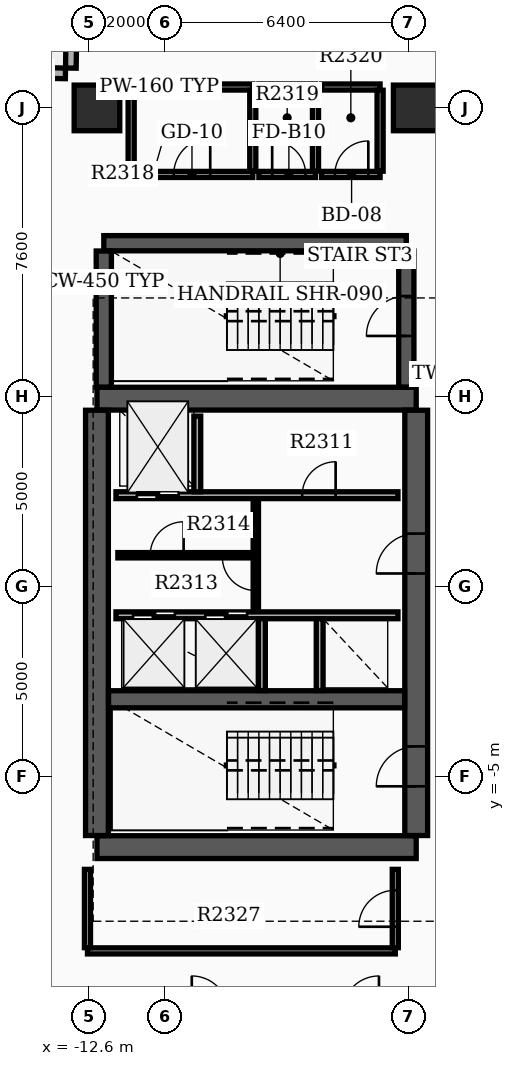
"""IFC4 building model, lengths in metres.
Left out: names, types, materials, properties, quantities, classifications, styles, units other than length and angle.
Written with IfcOpenShell. Run it as: python <this file> out.ifc"""

import sys

from ifc_helpers import new_model, si_unit, direction, frame, frame_2d, origin, origin_2d, place, context, subcontext, project, spatial, rectangle, extrude, element, fill, save


model = new_model("IFC4")
c1 = context("Model", 3, precision=1e-05, world=origin(), true_north=direction((0.0, 1.0)))
c2 = subcontext(c1, "Body", "Model", "MODEL_VIEW")
j1 = project(units=[si_unit("LENGTHUNIT", "METRE"), si_unit("PLANEANGLEUNIT", "RADIAN")], contexts=[c1])
p1 = place(None, origin())
s1 = spatial("IfcSite", under=j1, at=p1, CompositionType="ELEMENT")
p2 = place(p1, origin())
s2 = spatial("IfcBuilding", under=s1, at=p2, CompositionType="ELEMENT")
p3 = place(p2, frame((0.0, 0.0, 148.8)))
s3 = spatial("IfcBuildingStorey", under=s2, at=p3, CompositionType="ELEMENT", Elevation=148.8)
for number, where, z_axis, x_axis in (
    (1, (-12.4, -6.85, 0.0), (0.0, 0.0, 1.0), (1.0, 0.0, 0.0)),
    (2, (-12.4, 4.95, 0.0), (0.0, 0.0, 1.0), (1.0, 0.0, 0.0)),
):
    element("IfcWall", number, at=place(p3, frame(where, z_axis=z_axis, x_axis=x_axis)), inside=s3, PredefinedType="SHEAR", context=c2, shape_type="SweptSolid", body=[
        extrude(rectangle(XDim=8.4, YDim=0.6, at=frame_2d((4.2, 0.0))), origin(), (0.0, 0.0, 1.0), 3.7),
    ])
p4 = place(p3, frame((-12.4, -6.545, 0.0), z_axis=(0.0, 0.0, 1.0), x_axis=(0.0, 1.0, 0.0)))
e3 = element("IfcWall", 3, at=p4, inside=s3, PredefinedType="SHEAR", context=c2, shape_type="SweptSolid", body=[
    extrude(rectangle(XDim=11.19, YDim=0.6, at=frame_2d((5.595, 0.0))), origin(), (0.0, 0.0, 1.0), 3.7),
])
p5 = place(p3, frame((-4.0, -6.545, 0.0), z_axis=(0.0, 0.0, 1.0), x_axis=(0.0, 1.0, 0.0)))
e4 = element("IfcWall", 4, at=p5, inside=s3, PredefinedType="SHEAR", context=c2, shape_type="SweptSolid", body=[
    extrude(rectangle(XDim=11.19, YDim=0.6, at=frame_2d((5.595, 0.0))), origin(), (0.0, 0.0, 1.0), 3.7),
])
p6 = place(p5, frame((1.295, 0.0, 0.0)))
e5 = element("IfcOpeningElement", 5, at=p6, cuts=e4, PredefinedType="OPENING", context=c2, shape_type="SweptSolid", body=[
    extrude(rectangle(XDim=1.05, YDim=2.15, at=frame_2d((0.525, 1.075))), frame((0.0, 0.31, 0.0), z_axis=(0.0, -1.0, 0.0), x_axis=(1.0, 0.0, 0.0)), (0.0, 0.0, 1.0), 0.62),
])
p7 = place(p5, frame((6.895, 0.0, 0.0)))
e6 = element("IfcOpeningElement", 6, at=p7, cuts=e4, PredefinedType="OPENING", context=c2, shape_type="SweptSolid", body=[
    extrude(rectangle(XDim=1.05, YDim=2.15, at=frame_2d((0.525, 1.075))), frame((0.0, 0.31, 0.0), z_axis=(0.0, -1.0, 0.0), x_axis=(1.0, 0.0, 0.0)), (0.0, 0.0, 1.0), 0.62),
])
p8 = place(p3, frame((-12.095, -2.96, 0.0), z_axis=(0.0, 0.0, 1.0), x_axis=(1.0, 0.0, 0.0)))
e7 = element("IfcWall", 7, at=p8, inside=s3, PredefinedType="SHEAR", context=c2, shape_type="SweptSolid", body=[
    extrude(rectangle(XDim=7.79, YDim=0.45, at=frame_2d((3.895, 0.0))), origin(), (0.0, 0.0, 1.0), 3.7),
])
p9 = place(p3, frame((-12.22, 9.04, 0.0), z_axis=(0.0, 0.0, 1.0), x_axis=(1.0, 0.0, 0.0)))
e8 = element("IfcWall", 8, at=p9, inside=s3, PredefinedType="SHEAR", context=c2, shape_type="SweptSolid", body=[
    extrude(rectangle(XDim=7.96, YDim=0.4, at=frame_2d((3.98, 0.0))), origin(), (0.0, 0.0, 1.0), 3.7),
])
p10 = place(p3, frame((-12.22, 5.255, 0.0), z_axis=(0.0, 0.0, 1.0), x_axis=(0.0, 1.0, 0.0)))
e9 = element("IfcWall", 9, at=p10, inside=s3, PredefinedType="SHEAR", context=c2, shape_type="SweptSolid", body=[
    extrude(rectangle(XDim=3.58, YDim=0.4, at=frame_2d((1.79, 0.0))), origin(), (0.0, 0.0, 1.0), 3.7),
])
p11 = place(p3, frame((-4.26, 5.255, 0.0), z_axis=(0.0, 0.0, 1.0), x_axis=(0.0, 1.0, 0.0)))
e10 = element("IfcWall", 10, at=p11, inside=s3, PredefinedType="SHEAR", context=c2, shape_type="SweptSolid", body=[
    extrude(rectangle(XDim=3.58, YDim=0.4, at=frame_2d((1.79, 0.0))), origin(), (0.0, 0.0, 1.0), 3.7),
])
p12 = place(p11, frame((1.345, 0.0, 0.0)))
e11 = element("IfcOpeningElement", 11, at=p12, cuts=e10, PredefinedType="OPENING", context=c2, shape_type="SweptSolid", body=[
    extrude(rectangle(XDim=1.05, YDim=2.15, at=frame_2d((0.525, 1.075))), frame((0.0, 0.21, 0.0), z_axis=(0.0, -1.0, 0.0), x_axis=(1.0, 0.0, 0.0)), (0.0, 0.0, 1.0), 0.42),
])
for number, where, z_axis, x_axis in (
    (12, (-12.4, 12.6, 0.0), (0.0, 0.0, 1.0), (1.0, 0.0, 0.0)),
    (13, (-4.0, 12.6, 0.0), (0.0, 0.0, 1.0), (1.0, 0.0, 0.0)),
):
    element("IfcColumn", number, at=place(p3, frame(where, z_axis=z_axis, x_axis=x_axis)), inside=s3, PredefinedType="COLUMN", context=c2, shape_type="SweptSolid", body=[
        extrude(rectangle(XDim=1.2, YDim=1.2, at=origin_2d()), origin(), (0.0, 0.0, 1.0), 3.9),
    ])
p13 = place(p3, frame((-14.449, 13.529, 0.0), z_axis=(0.0, 0.0, 1.0), x_axis=(0.999878147354, -0.015610587569, 0.0)))
e14 = element("IfcWall", 14, at=p13, inside=s3, PredefinedType="STANDARD", context=c2, shape_type="SweptSolid", body=[
    extrude(rectangle(XDim=1.22, YDim=0.28, at=frame_2d((0.61, 0.0))), origin(), (0.0, 0.0, 1.0), 2.97),
])
p14 = place(p3, frame((-13.087, 13.647, 0.0), z_axis=(0.0, 0.0, 1.0), x_axis=(0.015785793208, 0.999875396603, 0.0)))
e15 = element("IfcWall", 15, at=p14, inside=s3, PredefinedType="STANDARD", context=c2, shape_type="SweptSolid", body=[
    extrude(rectangle(XDim=1.5, YDim=0.28, at=frame_2d((0.75, 0.0))), origin(), (0.0, 0.0, 1.0), 2.97),
])
p15 = place(p3, frame((-11.9, 2.41, 0.0), z_axis=(0.0, 0.0, 1.0), x_axis=(1.0, 0.0, 0.0)))
e16 = element("IfcWall", 16, at=p15, inside=s3, PredefinedType="SOLIDWALL", context=c2, shape_type="SweptSolid", body=[
    extrude(rectangle(XDim=7.42, YDim=0.18, at=frame_2d((3.71, 0.0))), origin(), (0.0, 0.0, 1.0), 2.96),
])
p16 = place(p15, frame((0.55, 0.0, 0.0)))
e17 = element("IfcOpeningElement", 17, at=p16, cuts=e16, PredefinedType="OPENING", context=c2, shape_type="SweptSolid", body=[
    extrude(rectangle(XDim=1.1, YDim=2.15, at=frame_2d((0.55, 1.075))), frame((0.0, 0.1, 0.0), z_axis=(0.0, -1.0, 0.0), x_axis=(1.0, 0.0, 0.0)), (0.0, 0.0, 1.0), 0.2),
])
p17 = place(p15, frame((4.9, 0.0, 0.0)))
e18 = element("IfcOpeningElement", 18, at=p17, cuts=e16, PredefinedType="OPENING", context=c2, shape_type="SweptSolid", body=[
    extrude(rectangle(XDim=0.88, YDim=2.1, at=frame_2d((0.44, 1.05))), frame((0.0, 0.1, 0.0), z_axis=(0.0, -1.0, 0.0), x_axis=(1.0, 0.0, 0.0)), (0.0, 0.0, 1.0), 0.2),
])
p18 = place(p3, frame((-11.9, -0.75, 0.0), z_axis=(0.0, 0.0, 1.0), x_axis=(1.0, 0.0, 0.0)))
e19 = element("IfcWall", 19, at=p18, inside=s3, PredefinedType="SOLIDWALL", context=c2, shape_type="SweptSolid", body=[
    extrude(rectangle(XDim=7.42, YDim=0.18, at=frame_2d((3.71, 0.0))), origin(), (0.0, 0.0, 1.0), 2.96),
])
p19 = place(p18, frame((0.45, 0.0, 0.0)))
e20 = element("IfcOpeningElement", 20, at=p19, cuts=e19, PredefinedType="OPENING", context=c2, shape_type="SweptSolid", body=[
    extrude(rectangle(XDim=1.1, YDim=2.15, at=frame_2d((0.55, 1.075))), frame((0.0, 0.1, 0.0), z_axis=(0.0, -1.0, 0.0), x_axis=(1.0, 0.0, 0.0)), (0.0, 0.0, 1.0), 0.2),
])
p20 = place(p18, frame((2.35, 0.0, 0.0)))
e21 = element("IfcOpeningElement", 21, at=p20, cuts=e19, PredefinedType="OPENING", context=c2, shape_type="SweptSolid", body=[
    extrude(rectangle(XDim=1.1, YDim=2.15, at=frame_2d((0.55, 1.075))), frame((0.0, 0.1, 0.0), z_axis=(0.0, -1.0, 0.0), x_axis=(1.0, 0.0, 0.0)), (0.0, 0.0, 1.0), 0.2),
])
p21 = place(p3, frame((-9.76, 2.5, 0.0), z_axis=(0.0, 0.0, 1.0), x_axis=(0.0, 1.0, 0.0)))
e22 = element("IfcWall", 22, at=p21, inside=s3, PredefinedType="SOLIDWALL", context=c2, shape_type="SweptSolid", body=[
    extrude(rectangle(XDim=1.99, YDim=0.18, at=frame_2d((0.995, 0.0))), origin(), (0.0, 0.0, 1.0), 2.96),
])
for number, where, z_axis, x_axis in (
    (23, (-8.06, -2.73, 0.0), (0.0, 0.0, 1.0), (0.0, 1.0, 0.0)),
    (24, (-6.54, -2.73, 0.0), (0.0, 0.0, 1.0), (0.0, 1.0, 0.0)),
):
    element("IfcWall", number, at=place(p3, frame(where, z_axis=z_axis, x_axis=x_axis)), inside=s3, PredefinedType="SOLIDWALL", context=c2, shape_type="SweptSolid", body=[
        extrude(rectangle(XDim=1.89, YDim=0.18, at=frame_2d((0.945, 0.0))), origin(), (0.0, 0.0, 1.0), 2.96),
    ])
p22 = place(p3, frame((-8.22, -0.65, 0.0), z_axis=(0.0, 0.0, 1.0), x_axis=(0.0, 1.0, 0.0)))
e25 = element("IfcWall", 25, at=p22, inside=s3, PredefinedType="SOLIDWALL", context=c2, shape_type="SweptSolid", body=[
    extrude(rectangle(XDim=2.96, YDim=0.14, at=frame_2d((1.48, 0.0))), origin(), (0.0, 0.0, 1.0), 2.96),
])
p23 = place(p22, frame((0.55, 0.0, 0.0)))
e26 = element("IfcOpeningElement", 26, at=p23, cuts=e25, PredefinedType="OPENING", context=c2, shape_type="SweptSolid", body=[
    extrude(rectangle(XDim=0.88, YDim=2.1, at=frame_2d((0.44, 1.05))), frame((0.0, 0.08, 0.0), z_axis=(0.0, -1.0, 0.0), x_axis=(1.0, 0.0, 0.0)), (0.0, 0.0, 1.0), 0.16),
])
p24 = place(p3, frame((-11.85, 0.83, 0.0), z_axis=(0.0, 0.0, 1.0), x_axis=(1.0, 0.0, 0.0)))
e27 = element("IfcWall", 27, at=p24, inside=s3, PredefinedType="PARTITIONING", context=c2, shape_type="SweptSolid", body=[
    extrude(rectangle(XDim=3.552, YDim=0.14, at=frame_2d((1.776, 0.0))), origin(), (0.0, 0.0, 1.0), 2.96),
])
p25 = place(p24, frame((0.85, 0.0, 0.0)))
e28 = element("IfcOpeningElement", 28, at=p25, cuts=e27, PredefinedType="OPENING", context=c2, shape_type="SweptSolid", body=[
    extrude(rectangle(XDim=0.88, YDim=2.1, at=frame_2d((0.44, 1.05))), frame((0.0, 0.08, 0.0), z_axis=(0.0, -1.0, 0.0), x_axis=(1.0, 0.0, 0.0)), (0.0, 0.0, 1.0), 0.16),
])
p26 = place(p3, frame((-11.5, 10.85, 0.0), z_axis=(0.0, 0.0, 1.0), x_axis=(1.0, 0.0, 0.0)))
e29 = element("IfcWall", 29, at=p26, inside=s3, PredefinedType="PARTITIONING", context=c2, shape_type="SweptSolid", body=[
    extrude(rectangle(XDim=3.2, YDim=0.16, at=frame_2d((1.6, 0.0))), origin(), (0.0, 0.0, 1.0), 2.96),
])
p27 = place(p26, frame((1.12, 0.0, 0.0)))
e30 = element("IfcOpeningElement", 30, at=p27, cuts=e29, PredefinedType="OPENING", context=c2, shape_type="SweptSolid", body=[
    extrude(rectangle(XDim=0.96, YDim=2.15, at=frame_2d((0.48, 1.075))), frame((0.0, 0.09, 0.0), z_axis=(0.0, -1.0, 0.0), x_axis=(1.0, 0.0, 0.0)), (0.0, 0.0, 1.0), 0.18),
])
p28 = place(p3, frame((-11.5, 13.15, 0.0), z_axis=(0.0, 0.0, 1.0), x_axis=(1.0, 0.0, 0.0)))
e31 = element("IfcWall", 31, at=p28, inside=s3, PredefinedType="PARTITIONING", context=c2, shape_type="SweptSolid", body=[
    extrude(rectangle(XDim=3.2, YDim=0.16, at=frame_2d((1.6, 0.0))), origin(), (0.0, 0.0, 1.0), 2.96),
])
for number, where, z_axis, x_axis in (
    (32, (-11.5, 10.935, 0.0), (0.0, 0.0, 1.0), (0.0, 1.0, 0.0)),
    (33, (-8.3, 10.935, 0.0), (0.0, 0.0, 1.0), (0.0, 1.0, 0.0)),
):
    element("IfcWall", number, at=place(p3, frame(where, z_axis=z_axis, x_axis=x_axis)), inside=s3, PredefinedType="PARTITIONING", context=c2, shape_type="SweptSolid", body=[
        extrude(rectangle(XDim=2.13, YDim=0.16, at=frame_2d((1.065, 0.0))), origin(), (0.0, 0.0, 1.0), 2.96),
    ])
p29 = place(p3, frame((-8.14, 10.85, 0.0), z_axis=(0.0, 0.0, 1.0), x_axis=(1.0, 0.0, 0.0)))
e34 = element("IfcWall", 34, at=p29, inside=s3, PredefinedType="PARTITIONING", context=c2, shape_type="SweptSolid", body=[
    extrude(rectangle(XDim=1.49, YDim=0.16, at=frame_2d((0.745, 0.0))), origin(), (0.0, 0.0, 1.0), 2.96),
])
p30 = place(p29, frame((0.35, 0.0, 0.0)))
e35 = element("IfcOpeningElement", 35, at=p30, cuts=e34, PredefinedType="OPENING", context=c2, shape_type="SweptSolid", body=[
    extrude(rectangle(XDim=0.88, YDim=2.1, at=frame_2d((0.44, 1.05))), frame((0.0, 0.09, 0.0), z_axis=(0.0, -1.0, 0.0), x_axis=(1.0, 0.0, 0.0)), (0.0, 0.0, 1.0), 0.18),
])
p31 = place(p3, frame((-8.14, 13.15, 0.0), z_axis=(0.0, 0.0, 1.0), x_axis=(1.0, 0.0, 0.0)))
e36 = element("IfcWall", 36, at=p31, inside=s3, PredefinedType="PARTITIONING", context=c2, shape_type="SweptSolid", body=[
    extrude(rectangle(XDim=1.49, YDim=0.16, at=frame_2d((0.745, 0.0))), origin(), (0.0, 0.0, 1.0), 2.96),
])
p32 = place(p3, frame((-6.65, 10.935, 0.0), z_axis=(0.0, 0.0, 1.0), x_axis=(0.0, 1.0, 0.0)))
e37 = element("IfcWall", 37, at=p32, inside=s3, PredefinedType="PARTITIONING", context=c2, shape_type="SweptSolid", body=[
    extrude(rectangle(XDim=2.13, YDim=0.16, at=frame_2d((1.065, 0.0))), origin(), (0.0, 0.0, 1.0), 2.96),
])
p33 = place(p3, frame((-6.49, 10.85, 0.0), z_axis=(0.0, 0.0, 1.0), x_axis=(1.0, 0.0, 0.0)))
e38 = element("IfcWall", 38, at=p33, inside=s3, PredefinedType="PARTITIONING", context=c2, shape_type="SweptSolid", body=[
    extrude(rectangle(XDim=1.54, YDim=0.16, at=frame_2d((0.77, 0.0))), origin(), (0.0, 0.0, 1.0), 2.96),
])
p34 = place(p33, frame((0.35, 0.0, 0.0)))
e39 = element("IfcOpeningElement", 39, at=p34, cuts=e38, PredefinedType="OPENING", context=c2, shape_type="SweptSolid", body=[
    extrude(rectangle(XDim=0.88, YDim=2.15, at=frame_2d((0.44, 1.075))), frame((0.0, 0.09, 0.0), z_axis=(0.0, -1.0, 0.0), x_axis=(1.0, 0.0, 0.0)), (0.0, 0.0, 1.0), 0.18),
])
p35 = place(p3, frame((-6.49, 13.15, 0.0), z_axis=(0.0, 0.0, 1.0), x_axis=(1.0, 0.0, 0.0)))
e40 = element("IfcWall", 40, at=p35, inside=s3, PredefinedType="PARTITIONING", context=c2, shape_type="SweptSolid", body=[
    extrude(rectangle(XDim=1.54, YDim=0.16, at=frame_2d((0.77, 0.0))), origin(), (0.0, 0.0, 1.0), 2.96),
])
p36 = place(p3, frame((-4.95, 10.935, 0.0), z_axis=(0.0, 0.0, 1.0), x_axis=(0.0, 1.0, 0.0)))
e41 = element("IfcWall", 41, at=p36, inside=s3, PredefinedType="PARTITIONING", context=c2, shape_type="SweptSolid", body=[
    extrude(rectangle(XDim=2.13, YDim=0.16, at=frame_2d((1.065, 0.0))), origin(), (0.0, 0.0, 1.0), 2.96),
])
p37 = place(p3, frame((-12.65, -9.58, 0.0), z_axis=(0.0, 0.0, 1.0), x_axis=(1.0, 0.0, 0.0)))
e42 = element("IfcWall", 42, at=p37, inside=s3, PredefinedType="PARTITIONING", context=c2, shape_type="SweptSolid", body=[
    extrude(rectangle(XDim=8.1, YDim=0.16, at=frame_2d((4.05, 0.0))), origin(), (0.0, 0.0, 1.0), 2.96),
])
p38 = place(p3, frame((-12.65, -9.495, 0.0), z_axis=(0.0, 0.0, 1.0), x_axis=(0.0, 1.0, 0.0)))
e43 = element("IfcWall", 43, at=p38, inside=s3, PredefinedType="PARTITIONING", context=c2, shape_type="SweptSolid", body=[
    extrude(rectangle(XDim=2.06, YDim=0.16, at=frame_2d((1.03, 0.0))), origin(), (0.0, 0.0, 1.0), 2.96),
])
p39 = place(p3, frame((-4.55, -9.495, 0.0), z_axis=(0.0, 0.0, 1.0), x_axis=(0.0, 1.0, 0.0)))
e44 = element("IfcWall", 44, at=p39, inside=s3, PredefinedType="PARTITIONING", context=c2, shape_type="SweptSolid", body=[
    extrude(rectangle(XDim=2.06, YDim=0.16, at=frame_2d((1.03, 0.0))), origin(), (0.0, 0.0, 1.0), 2.96),
])
p40 = place(p39, frame((0.55, 0.0, 0.0)))
e45 = element("IfcOpeningElement", 45, at=p40, cuts=e44, PredefinedType="OPENING", context=c2, shape_type="SweptSolid", body=[
    extrude(rectangle(XDim=0.96, YDim=2.15, at=frame_2d((0.48, 1.075))), frame((0.0, 0.09, 0.0), z_axis=(0.0, -1.0, 0.0), x_axis=(1.0, 0.0, 0.0)), (0.0, 0.0, 1.0), 0.18),
])
p41 = place(p6, origin())
e46 = element("IfcDoor", 46, at=p41, inside=s3, OperationType="SINGLE_SWING_LEFT", PredefinedType="DOOR", context=c2, shape_type="SweptSolid", body=[
    extrude(rectangle(XDim=1.05, YDim=2.15, at=frame_2d((0.525, 1.075))), frame((0.0, 0.025, 0.0), z_axis=(0.0, -1.0, 0.0), x_axis=(1.0, 0.0, 0.0)), (0.0, 0.0, 1.0), 0.05),
])
fill(e5, e46)
p42 = place(p7, origin())
e47 = element("IfcDoor", 47, at=p42, inside=s3, OperationType="SINGLE_SWING_LEFT", PredefinedType="DOOR", context=c2, shape_type="SweptSolid", body=[
    extrude(rectangle(XDim=1.05, YDim=2.15, at=frame_2d((0.525, 1.075))), frame((0.0, 0.025, 0.0), z_axis=(0.0, -1.0, 0.0), x_axis=(1.0, 0.0, 0.0)), (0.0, 0.0, 1.0), 0.05),
])
fill(e6, e47)
p43 = place(p12, origin())
e48 = element("IfcDoor", 48, at=p43, inside=s3, OperationType="SINGLE_SWING_LEFT", PredefinedType="DOOR", context=c2, shape_type="SweptSolid", body=[
    extrude(rectangle(XDim=1.05, YDim=2.15, at=frame_2d((0.525, 1.075))), frame((0.0, 0.025, 0.0), z_axis=(0.0, -1.0, 0.0), x_axis=(1.0, 0.0, 0.0)), (0.0, 0.0, 1.0), 0.05),
])
fill(e11, e48)
p44 = place(p16, origin())
e49 = element("IfcDoor", 49, at=p44, inside=s3, OperationType="DOUBLE_DOOR_SLIDING", PredefinedType="DOOR", context=c2, shape_type="SweptSolid", body=[
    extrude(rectangle(XDim=1.1, YDim=2.15, at=frame_2d((0.55, 1.075))), frame((0.0, 0.025, 0.0), z_axis=(0.0, -1.0, 0.0), x_axis=(1.0, 0.0, 0.0)), (0.0, 0.0, 1.0), 0.05),
])
fill(e17, e49)
p45 = place(p19, origin())
e50 = element("IfcDoor", 50, at=p45, inside=s3, OperationType="DOUBLE_DOOR_SLIDING", PredefinedType="DOOR", context=c2, shape_type="SweptSolid", body=[
    extrude(rectangle(XDim=1.1, YDim=2.15, at=frame_2d((0.55, 1.075))), frame((0.0, 0.025, 0.0), z_axis=(0.0, -1.0, 0.0), x_axis=(1.0, 0.0, 0.0)), (0.0, 0.0, 1.0), 0.05),
])
fill(e20, e50)
p46 = place(p20, origin())
e51 = element("IfcDoor", 51, at=p46, inside=s3, OperationType="DOUBLE_DOOR_SLIDING", PredefinedType="DOOR", context=c2, shape_type="SweptSolid", body=[
    extrude(rectangle(XDim=1.1, YDim=2.15, at=frame_2d((0.55, 1.075))), frame((0.0, 0.025, 0.0), z_axis=(0.0, -1.0, 0.0), x_axis=(1.0, 0.0, 0.0)), (0.0, 0.0, 1.0), 0.05),
])
fill(e21, e51)
p47 = place(p17, origin())
e52 = element("IfcDoor", 52, at=p47, inside=s3, OperationType="SINGLE_SWING_RIGHT", PredefinedType="DOOR", context=c2, shape_type="SweptSolid", body=[
    extrude(rectangle(XDim=0.88, YDim=2.1, at=frame_2d((0.44, 1.05))), frame((0.0, 0.025, 0.0), z_axis=(0.0, -1.0, 0.0), x_axis=(1.0, 0.0, 0.0)), (0.0, 0.0, 1.0), 0.05),
])
fill(e18, e52)
p48 = place(p23, origin())
e53 = element("IfcDoor", 53, at=p48, inside=s3, OperationType="SINGLE_SWING_RIGHT", PredefinedType="DOOR", context=c2, shape_type="SweptSolid", body=[
    extrude(rectangle(XDim=0.88, YDim=2.1, at=frame_2d((0.44, 1.05))), frame((0.0, 0.025, 0.0), z_axis=(0.0, -1.0, 0.0), x_axis=(1.0, 0.0, 0.0)), (0.0, 0.0, 1.0), 0.05),
])
fill(e26, e53)
p49 = place(p25, origin())
e54 = element("IfcDoor", 54, at=p49, inside=s3, OperationType="SINGLE_SWING_RIGHT", PredefinedType="DOOR", context=c2, shape_type="SweptSolid", body=[
    extrude(rectangle(XDim=0.88, YDim=2.1, at=frame_2d((0.44, 1.05))), frame((0.0, 0.025, 0.0), z_axis=(0.0, -1.0, 0.0), x_axis=(1.0, 0.0, 0.0)), (0.0, 0.0, 1.0), 0.05),
])
fill(e28, e54)
p50 = place(p27, origin())
e55 = element("IfcDoor", 55, at=p50, inside=s3, OperationType="SINGLE_SWING_RIGHT", PredefinedType="DOOR", context=c2, shape_type="SweptSolid", body=[
    extrude(rectangle(XDim=0.96, YDim=2.15, at=frame_2d((0.48, 1.075))), frame((0.0, 0.025, 0.0), z_axis=(0.0, -1.0, 0.0), x_axis=(1.0, 0.0, 0.0)), (0.0, 0.0, 1.0), 0.05),
])
fill(e30, e55)
p51 = place(p30, origin())
e56 = element("IfcDoor", 56, at=p51, inside=s3, OperationType="SINGLE_SWING_LEFT", PredefinedType="DOOR", context=c2, shape_type="SweptSolid", body=[
    extrude(rectangle(XDim=0.88, YDim=2.1, at=frame_2d((0.44, 1.05))), frame((0.0, 0.025, 0.0), z_axis=(0.0, -1.0, 0.0), x_axis=(1.0, 0.0, 0.0)), (0.0, 0.0, 1.0), 0.05),
])
fill(e35, e56)
p52 = place(p34, origin())
e57 = element("IfcDoor", 57, at=p52, inside=s3, OperationType="SINGLE_SWING_RIGHT", PredefinedType="DOOR", context=c2, shape_type="SweptSolid", body=[
    extrude(rectangle(XDim=0.88, YDim=2.15, at=frame_2d((0.44, 1.075))), frame((0.0, 0.025, 0.0), z_axis=(0.0, -1.0, 0.0), x_axis=(1.0, 0.0, 0.0)), (0.0, 0.0, 1.0), 0.05),
])
fill(e39, e57)
p53 = place(p40, origin())
e58 = element("IfcDoor", 58, at=p53, inside=s3, OperationType="SINGLE_SWING_LEFT", PredefinedType="DOOR", context=c2, shape_type="SweptSolid", body=[
    extrude(rectangle(XDim=0.96, YDim=2.15, at=frame_2d((0.48, 1.075))), frame((0.0, 0.025, 0.0), z_axis=(0.0, -1.0, 0.0), x_axis=(1.0, 0.0, 0.0)), (0.0, 0.0, 1.0), 0.05),
])
fill(e45, e58)
save(model, sys.argv[1])
